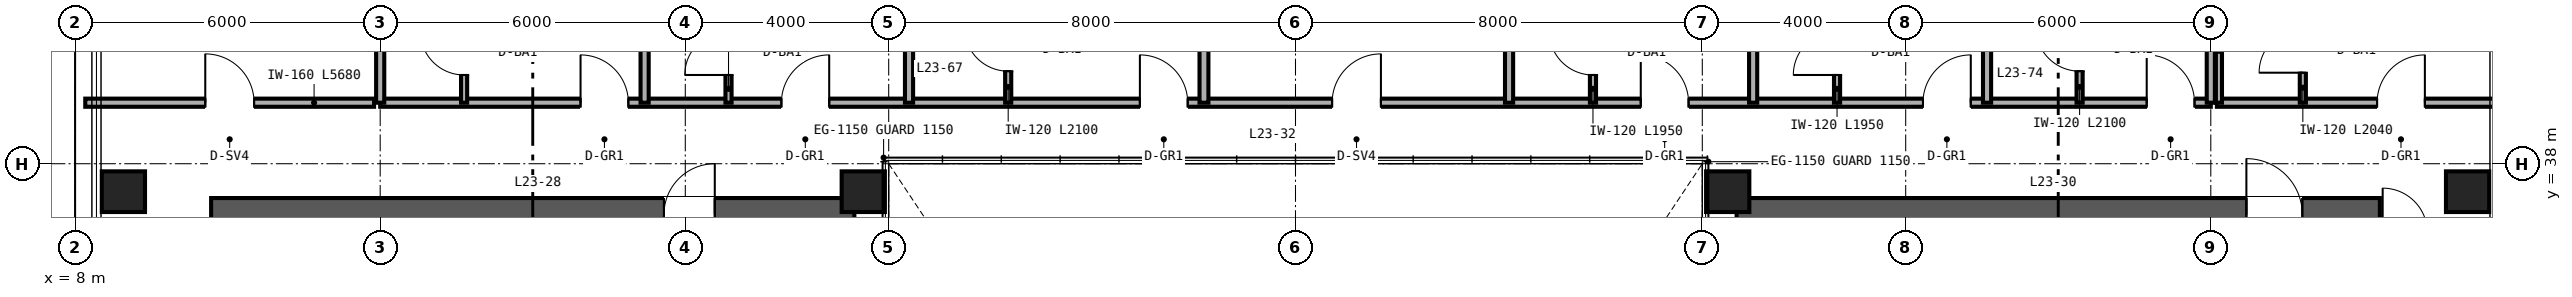
"""IFC4 building model, lengths in metres.
Left out: names, types, materials, properties, quantities, classifications, styles, units other than length and angle.
Written with IfcOpenShell. Run it as: python <this file> out.ifc"""

import sys

from ifc_helpers import new_model, si_unit, direction, frame, frame_2d, origin, origin_2d, place, context, subcontext, project, spatial, rectangle, hollow_rectangle, extrude, source, transform, mapped, element, fill, save


model = new_model("IFC4")
c1 = context("Model", 3, precision=1e-05, world=origin(), true_north=direction((0.0, 1.0)))
c2 = subcontext(c1, "Body", "Model", "MODEL_VIEW")
j1 = project(units=[si_unit("LENGTHUNIT", "METRE"), si_unit("PLANEANGLEUNIT", "RADIAN")], contexts=[c1])
p1 = place(None, origin())
s1 = spatial("IfcSite", under=j1, at=p1, CompositionType="ELEMENT")
p2 = place(p1, origin())
s2 = spatial("IfcBuilding", under=s1, at=p2, CompositionType="ELEMENT")
p3 = place(p2, frame((0.0, 0.0, 97.2)))
s3 = spatial("IfcBuildingStorey", under=s2, at=p3, CompositionType="ELEMENT", Elevation=97.2)
p4 = place(p3, frame((10.675, 37.0, 0.0), z_axis=(0.0, 0.0, 1.0), x_axis=(1.0, 0.0, 0.0)))
e1 = element("IfcWall", 1, at=p4, inside=s3, PredefinedType="SHEAR", context=c2, shape_type="SweptSolid", body=[
    extrude(rectangle(XDim=12.65, YDim=0.65, at=frame_2d((6.325, 0.0))), origin(), (0.0, 0.0, 1.0), 3.36),
])
p5 = place(p4, frame((8.905, 0.0, 0.0)))
e2 = element("IfcOpeningElement", 2, at=p5, cuts=e1, PredefinedType="OPENING", context=c2, shape_type="SweptSolid", body=[
    extrude(rectangle(XDim=1.0, YDim=2.15, at=frame_2d((0.5, 1.075))), frame((0.0, 0.335, 0.0), z_axis=(0.0, -1.0, 0.0), x_axis=(1.0, 0.0, 0.0)), (0.0, 0.0, 1.0), 0.67),
])
p6 = place(p3, frame((40.675, 37.0, 0.0), z_axis=(0.0, 0.0, 1.0), x_axis=(1.0, 0.0, 0.0)))
e3 = element("IfcWall", 3, at=p6, inside=s3, PredefinedType="SHEAR", context=c2, shape_type="SweptSolid", body=[
    extrude(rectangle(XDim=12.65, YDim=0.65, at=frame_2d((6.325, 0.0))), origin(), (0.0, 0.0, 1.0), 3.36),
])
p7 = place(p6, frame((10.025, 0.0, 0.0)))
e4 = element("IfcOpeningElement", 4, at=p7, cuts=e3, PredefinedType="OPENING", context=c2, shape_type="SweptSolid", body=[
    extrude(rectangle(XDim=1.1, YDim=2.15, at=frame_2d((0.55, 1.075))), frame((0.0, 0.335, 0.0), z_axis=(0.0, -1.0, 0.0), x_axis=(1.0, 0.0, 0.0)), (0.0, 0.0, 1.0), 0.67),
])
m1 = source(origin(), c2, "Body", "SweptSolid", [
    extrude(hollow_rectangle(XDim=0.85, YDim=0.8, WallThickness=0.032, at=origin_2d()), origin(), (0.0, 0.0, 1.0), 3.36),
])
for number, where, z_axis, x_axis in (
    (5, (8.95, 37.45, 0.0), (0.0, 0.0, 1.0), (1.0, 0.0, 0.0)),
    (6, (23.5, 37.45, 0.0), (0.0, 0.0, 1.0), (1.0, 0.0, 0.0)),
    (7, (40.5, 37.45, 0.0), (0.0, 0.0, 1.0), (1.0, 0.0, 0.0)),
    (8, (55.05, 37.45, 0.0), (0.0, 0.0, 1.0), (1.0, 0.0, 0.0)),
):
    element("IfcColumn", number, at=place(p3, frame(where, z_axis=z_axis, x_axis=x_axis)), inside=s3, PredefinedType="COLUMN", context=c2, shape_type="MappedRepresentation", body=[
        mapped(m1, transform((0.0, 0.0, 0.0), scale=1.0)),
    ])
p8 = place(p3, frame((8.2, 39.2, 0.0), z_axis=(0.0, 0.0, 1.0), x_axis=(1.0, 0.0, 0.0)))
e9 = element("IfcWall", 9, at=p8, inside=s3, PredefinedType="PARTITIONING", context=c2, shape_type="SweptSolid", body=[
    extrude(rectangle(XDim=5.68, YDim=0.16, at=frame_2d((2.84, 0.0))), origin(), (0.0, 0.0, 1.0), 3.36),
])
p9 = place(p8, frame((2.36, 0.0, 0.0)))
e10 = element("IfcOpeningElement", 10, at=p9, cuts=e9, PredefinedType="OPENING", context=c2, shape_type="SweptSolid", body=[
    extrude(rectangle(XDim=0.96, YDim=2.15, at=frame_2d((0.48, 1.075))), frame((0.0, 0.09, 0.0), z_axis=(0.0, -1.0, 0.0), x_axis=(1.0, 0.0, 0.0)), (0.0, 0.0, 1.0), 0.18),
])
p10 = place(p3, frame((50.12, 39.2, 0.0), z_axis=(0.0, 0.0, 1.0), x_axis=(1.0, 0.0, 0.0)))
e11 = element("IfcWall", 11, at=p10, inside=s3, PredefinedType="PARTITIONING", context=c2, shape_type="SweptSolid", body=[
    extrude(rectangle(XDim=5.68, YDim=0.16, at=frame_2d((2.84, 0.0))), origin(), (0.0, 0.0, 1.0), 3.36),
])
p11 = place(p10, frame((3.15, 0.0, 0.0)))
e12 = element("IfcOpeningElement", 12, at=p11, cuts=e11, PredefinedType="OPENING", context=c2, shape_type="SweptSolid", body=[
    extrude(rectangle(XDim=0.94, YDim=2.15, at=frame_2d((0.47, 1.075))), frame((0.0, 0.09, 0.0), z_axis=(0.0, -1.0, 0.0), x_axis=(1.0, 0.0, 0.0)), (0.0, 0.0, 1.0), 0.18),
])
p12 = place(p3, frame((51.81, 39.2, 0.0), z_axis=(0.0, 0.0, 1.0), x_axis=(0.0, 1.0, 0.0)))
e13 = element("IfcWall", 13, at=p12, inside=s3, PredefinedType="PARTITIONING", context=c2, shape_type="SweptSolid", body=[
    extrude(rectangle(XDim=2.04, YDim=0.12, at=frame_2d((1.02, 0.0))), origin(), (0.0, 0.0, 1.0), 3.36),
])
p13 = place(p12, frame((0.59, 0.0, 0.0)))
e14 = element("IfcOpeningElement", 14, at=p13, cuts=e13, PredefinedType="OPENING", context=c2, shape_type="SweptSolid", body=[
    extrude(rectangle(XDim=0.86, YDim=2.1, at=frame_2d((0.43, 1.05))), frame((0.0, 0.07, 0.0), z_axis=(0.0, -1.0, 0.0), x_axis=(1.0, 0.0, 0.0)), (0.0, 0.0, 1.0), 0.14),
])
p14 = place(p3, frame((50.16, 39.2, 0.0), z_axis=(0.0, 0.0, 1.0), x_axis=(0.0, 1.0, 0.0)))
e15 = element("IfcWall", 15, at=p14, inside=s3, PredefinedType="PARTITIONING", context=c2, shape_type="SweptSolid", body=[
    extrude(rectangle(XDim=2.04, YDim=0.12, at=frame_2d((1.02, 0.0))), origin(), (0.0, 0.0, 1.0), 3.36),
])
p15 = place(p3, frame((14.0, 39.2, 0.0), z_axis=(0.0, 0.0, 1.0), x_axis=(1.0, 0.0, 0.0)))
e16 = element("IfcWall", 16, at=p15, inside=s3, PredefinedType="PARTITIONING", context=c2, shape_type="SweptSolid", body=[
    extrude(rectangle(XDim=36.0, YDim=0.16, at=frame_2d((18.0, 0.0))), origin(), (0.0, 0.0, 1.0), 2.581),
])
p16 = place(p15, frame((3.94, 0.0, 0.0)))
e17 = element("IfcOpeningElement", 17, at=p16, cuts=e16, PredefinedType="OPENING", context=c2, shape_type="SweptSolid", body=[
    extrude(rectangle(XDim=0.94, YDim=2.15, at=frame_2d((0.47, 1.075))), frame((0.0, 0.09, 0.0), z_axis=(0.0, -1.0, 0.0), x_axis=(1.0, 0.0, 0.0)), (0.0, 0.0, 1.0), 0.18),
])
p17 = place(p15, frame((7.89, 0.0, 0.0)))
e18 = element("IfcOpeningElement", 18, at=p17, cuts=e16, PredefinedType="OPENING", context=c2, shape_type="SweptSolid", body=[
    extrude(rectangle(XDim=0.94, YDim=2.15, at=frame_2d((0.47, 1.075))), frame((0.0, 0.09, 0.0), z_axis=(0.0, -1.0, 0.0), x_axis=(1.0, 0.0, 0.0)), (0.0, 0.0, 1.0), 0.18),
])
p18 = place(p15, frame((14.94, 0.0, 0.0)))
e19 = element("IfcOpeningElement", 19, at=p18, cuts=e16, PredefinedType="OPENING", context=c2, shape_type="SweptSolid", body=[
    extrude(rectangle(XDim=0.94, YDim=2.15, at=frame_2d((0.47, 1.075))), frame((0.0, 0.09, 0.0), z_axis=(0.0, -1.0, 0.0), x_axis=(1.0, 0.0, 0.0)), (0.0, 0.0, 1.0), 0.18),
])
p19 = place(p15, frame((18.72, 0.0, 0.0)))
e20 = element("IfcOpeningElement", 20, at=p19, cuts=e16, PredefinedType="OPENING", context=c2, shape_type="SweptSolid", body=[
    extrude(rectangle(XDim=0.96, YDim=2.15, at=frame_2d((0.48, 1.075))), frame((0.0, 0.09, 0.0), z_axis=(0.0, -1.0, 0.0), x_axis=(1.0, 0.0, 0.0)), (0.0, 0.0, 1.0), 0.18),
])
p20 = place(p15, frame((24.79, 0.0, 0.0)))
e21 = element("IfcOpeningElement", 21, at=p20, cuts=e16, PredefinedType="OPENING", context=c2, shape_type="SweptSolid", body=[
    extrude(rectangle(XDim=0.94, YDim=2.15, at=frame_2d((0.47, 1.075))), frame((0.0, 0.09, 0.0), z_axis=(0.0, -1.0, 0.0), x_axis=(1.0, 0.0, 0.0)), (0.0, 0.0, 1.0), 0.18),
])
p21 = place(p15, frame((30.34, 0.0, 0.0)))
e22 = element("IfcOpeningElement", 22, at=p21, cuts=e16, PredefinedType="OPENING", context=c2, shape_type="SweptSolid", body=[
    extrude(rectangle(XDim=0.94, YDim=2.15, at=frame_2d((0.47, 1.075))), frame((0.0, 0.09, 0.0), z_axis=(0.0, -1.0, 0.0), x_axis=(1.0, 0.0, 0.0)), (0.0, 0.0, 1.0), 0.18),
])
p22 = place(p15, frame((34.74, 0.0, 0.0)))
e23 = element("IfcOpeningElement", 23, at=p22, cuts=e16, PredefinedType="OPENING", context=c2, shape_type="SweptSolid", body=[
    extrude(rectangle(XDim=0.94, YDim=2.15, at=frame_2d((0.47, 1.075))), frame((0.0, 0.09, 0.0), z_axis=(0.0, -1.0, 0.0), x_axis=(1.0, 0.0, 0.0)), (0.0, 0.0, 1.0), 0.18),
])
for number, where, z_axis, x_axis in (
    (24, (14.0, 39.2, 0.0), (0.0, 0.0, 1.0), (0.0, 1.0, 0.0)),
    (25, (50.0, 39.2, 0.0), (0.0, 0.0, 1.0), (0.0, 1.0, 0.0)),
    (26, (19.2, 39.2, 0.0), (0.0, 0.0, 1.0), (0.0, 1.0, 0.0)),
):
    element("IfcWall", number, at=place(p3, frame(where, z_axis=z_axis, x_axis=x_axis)), inside=s3, PredefinedType="PARTITIONING", context=c2, shape_type="SweptSolid", body=[
        extrude(rectangle(XDim=10.44, YDim=0.16, at=frame_2d((5.22, 0.0))), origin(), (0.0, 0.0, 1.0), 2.667),
    ])
p23 = place(p3, frame((15.65, 39.2, 0.0), z_axis=(0.0, 0.0, 1.0), x_axis=(0.0, 1.0, 0.0)))
e27 = element("IfcWall", 27, at=p23, inside=s3, PredefinedType="PARTITIONING", context=c2, shape_type="SweptSolid", body=[
    extrude(rectangle(XDim=1.95, YDim=0.12, at=frame_2d((0.975, 0.0))), origin(), (0.0, 0.0, 1.0), 3.36),
])
p24 = place(p23, frame((0.545, 0.0, 0.0)))
e28 = element("IfcOpeningElement", 28, at=p24, cuts=e27, PredefinedType="OPENING", context=c2, shape_type="SweptSolid", body=[
    extrude(rectangle(XDim=0.86, YDim=2.1, at=frame_2d((0.43, 1.05))), frame((0.0, 0.07, 0.0), z_axis=(0.0, -1.0, 0.0), x_axis=(1.0, 0.0, 0.0)), (0.0, 0.0, 1.0), 0.14),
])
p25 = place(p3, frame((24.4, 39.2, 0.0), z_axis=(0.0, 0.0, 1.0), x_axis=(0.0, 1.0, 0.0)))
e29 = element("IfcWall", 29, at=p25, inside=s3, PredefinedType="PARTITIONING", context=c2, shape_type="SweptSolid", body=[
    extrude(rectangle(XDim=10.44, YDim=0.16, at=frame_2d((5.22, 0.0))), origin(), (0.0, 0.0, 1.0), 2.433),
])
p26 = place(p3, frame((20.85, 39.2, 0.0), z_axis=(0.0, 0.0, 1.0), x_axis=(0.0, 1.0, 0.0)))
e30 = element("IfcWall", 30, at=p26, inside=s3, PredefinedType="PARTITIONING", context=c2, shape_type="SweptSolid", body=[
    extrude(rectangle(XDim=1.95, YDim=0.12, at=frame_2d((0.975, 0.0))), origin(), (0.0, 0.0, 1.0), 3.36),
])
p27 = place(p26, frame((0.545, 0.0, 0.0)))
e31 = element("IfcOpeningElement", 31, at=p27, cuts=e30, PredefinedType="OPENING", context=c2, shape_type="SweptSolid", body=[
    extrude(rectangle(XDim=0.86, YDim=2.1, at=frame_2d((0.43, 1.05))), frame((0.0, 0.07, 0.0), z_axis=(0.0, -1.0, 0.0), x_axis=(1.0, 0.0, 0.0)), (0.0, 0.0, 1.0), 0.14),
])
p28 = place(p3, frame((30.2, 39.2, 0.0), z_axis=(0.0, 0.0, 1.0), x_axis=(0.0, 1.0, 0.0)))
e32 = element("IfcWall", 32, at=p28, inside=s3, PredefinedType="PARTITIONING", context=c2, shape_type="SweptSolid", body=[
    extrude(rectangle(XDim=10.44, YDim=0.175, at=frame_2d((5.22, 0.0))), origin(), (0.0, 0.0, 1.0), 2.433),
])
p29 = place(p3, frame((26.35, 39.2, 0.0), z_axis=(0.0, 0.0, 1.0), x_axis=(0.0, 1.0, 0.0)))
e33 = element("IfcWall", 33, at=p29, inside=s3, PredefinedType="PARTITIONING", context=c2, shape_type="SweptSolid", body=[
    extrude(rectangle(XDim=2.1, YDim=0.12, at=frame_2d((1.05, 0.0))), origin(), (0.0, 0.0, 1.0), 3.36),
])
p30 = place(p29, frame((0.62, 0.0, 0.0)))
e34 = element("IfcOpeningElement", 34, at=p30, cuts=e33, PredefinedType="OPENING", context=c2, shape_type="SweptSolid", body=[
    extrude(rectangle(XDim=0.86, YDim=2.1, at=frame_2d((0.43, 1.05))), frame((0.0, 0.07, 0.0), z_axis=(0.0, -1.0, 0.0), x_axis=(1.0, 0.0, 0.0)), (0.0, 0.0, 1.0), 0.14),
])
p31 = place(p3, frame((36.2, 39.2, 0.0), z_axis=(0.0, 0.0, 1.0), x_axis=(0.0, 1.0, 0.0)))
e35 = element("IfcWall", 35, at=p31, inside=s3, PredefinedType="PARTITIONING", context=c2, shape_type="SweptSolid", body=[
    extrude(rectangle(XDim=10.44, YDim=0.16, at=frame_2d((5.22, 0.0))), origin(), (0.0, 0.0, 1.0), 2.433),
])
p32 = place(p3, frame((41.0, 39.2, 0.0), z_axis=(0.0, 0.0, 1.0), x_axis=(0.0, 1.0, 0.0)))
e36 = element("IfcWall", 36, at=p32, inside=s3, PredefinedType="PARTITIONING", context=c2, shape_type="SweptSolid", body=[
    extrude(rectangle(XDim=10.44, YDim=0.16, at=frame_2d((5.22, 0.0))), origin(), (0.0, 0.0, 1.0), 2.823),
])
p33 = place(p3, frame((37.85, 39.2, 0.0), z_axis=(0.0, 0.0, 1.0), x_axis=(0.0, 1.0, 0.0)))
e37 = element("IfcWall", 37, at=p33, inside=s3, PredefinedType="PARTITIONING", context=c2, shape_type="SweptSolid", body=[
    extrude(rectangle(XDim=1.95, YDim=0.12, at=frame_2d((0.975, 0.0))), origin(), (0.0, 0.0, 1.0), 3.36),
])
p34 = place(p33, frame((0.545, 0.0, 0.0)))
e38 = element("IfcOpeningElement", 38, at=p34, cuts=e37, PredefinedType="OPENING", context=c2, shape_type="SweptSolid", body=[
    extrude(rectangle(XDim=0.86, YDim=2.1, at=frame_2d((0.43, 1.05))), frame((0.0, 0.07, 0.0), z_axis=(0.0, -1.0, 0.0), x_axis=(1.0, 0.0, 0.0)), (0.0, 0.0, 1.0), 0.14),
])
p35 = place(p3, frame((45.6, 39.2, 0.0), z_axis=(0.0, 0.0, 1.0), x_axis=(0.0, 1.0, 0.0)))
e39 = element("IfcWall", 39, at=p35, inside=s3, PredefinedType="PARTITIONING", context=c2, shape_type="SweptSolid", body=[
    extrude(rectangle(XDim=10.44, YDim=0.16, at=frame_2d((5.22, 0.0))), origin(), (0.0, 0.0, 1.0), 2.667),
])
p36 = place(p3, frame((42.65, 39.2, 0.0), z_axis=(0.0, 0.0, 1.0), x_axis=(0.0, 1.0, 0.0)))
e40 = element("IfcWall", 40, at=p36, inside=s3, PredefinedType="PARTITIONING", context=c2, shape_type="SweptSolid", body=[
    extrude(rectangle(XDim=1.95, YDim=0.12, at=frame_2d((0.975, 0.0))), origin(), (0.0, 0.0, 1.0), 3.36),
])
p37 = place(p36, frame((0.545, 0.0, 0.0)))
e41 = element("IfcOpeningElement", 41, at=p37, cuts=e40, PredefinedType="OPENING", context=c2, shape_type="SweptSolid", body=[
    extrude(rectangle(XDim=0.86, YDim=2.1, at=frame_2d((0.43, 1.05))), frame((0.0, 0.07, 0.0), z_axis=(0.0, -1.0, 0.0), x_axis=(1.0, 0.0, 0.0)), (0.0, 0.0, 1.0), 0.14),
])
p38 = place(p3, frame((47.42, 39.2, 0.0), z_axis=(0.0, 0.0, 1.0), x_axis=(0.0, 1.0, 0.0)))
e42 = element("IfcWall", 42, at=p38, inside=s3, PredefinedType="PARTITIONING", context=c2, shape_type="SweptSolid", body=[
    extrude(rectangle(XDim=2.1, YDim=0.12, at=frame_2d((1.05, 0.0))), origin(), (0.0, 0.0, 1.0), 3.36),
])
p39 = place(p38, frame((0.62, 0.0, 0.0)))
e43 = element("IfcOpeningElement", 43, at=p39, cuts=e42, PredefinedType="OPENING", context=c2, shape_type="SweptSolid", body=[
    extrude(rectangle(XDim=0.86, YDim=2.1, at=frame_2d((0.43, 1.05))), frame((0.0, 0.07, 0.0), z_axis=(0.0, -1.0, 0.0), x_axis=(1.0, 0.0, 0.0)), (0.0, 0.0, 1.0), 0.14),
])
m2 = source(origin(), c2, "Body", "SweptSolid", [
    extrude(rectangle(XDim=1.0, YDim=2.15, at=frame_2d((0.5, 1.075))), frame((0.0, 0.025, 0.0), z_axis=(0.0, -1.0, 0.0), x_axis=(1.0, 0.0, 0.0)), (0.0, 0.0, 1.0), 0.05),
])
p40 = place(p5, origin())
e44 = element("IfcDoor", 44, at=p40, inside=s3, OperationType="SINGLE_SWING_RIGHT", PredefinedType="DOOR", context=c2, shape_type="MappedRepresentation", body=[
    mapped(m2, transform((0.0, 0.0, 0.0), scale=1.0)),
])
fill(e2, e44)
m3 = source(origin(), c2, "Body", "SweptSolid", [
    extrude(rectangle(XDim=1.1, YDim=2.15, at=frame_2d((0.55, 1.075))), frame((0.0, 0.025, 0.0), z_axis=(0.0, -1.0, 0.0), x_axis=(1.0, 0.0, 0.0)), (0.0, 0.0, 1.0), 0.05),
])
p41 = place(p7, origin())
e45 = element("IfcDoor", 45, at=p41, inside=s3, OperationType="SINGLE_SWING_LEFT", PredefinedType="DOOR", context=c2, shape_type="MappedRepresentation", body=[
    mapped(m3, transform((0.0, 0.0, 0.0), scale=1.0)),
])
fill(e4, e45)
m4 = source(origin(), c2, "Body", "SweptSolid", [
    extrude(rectangle(XDim=0.96, YDim=2.15, at=frame_2d((0.48, 1.075))), frame((0.0, 0.025, 0.0), z_axis=(0.0, -1.0, 0.0), x_axis=(1.0, 0.0, 0.0)), (0.0, 0.0, 1.0), 0.05),
])
p42 = place(p9, origin())
e46 = element("IfcDoor", 46, at=p42, inside=s3, OperationType="SINGLE_SWING_LEFT", PredefinedType="DOOR", context=c2, shape_type="MappedRepresentation", body=[
    mapped(m4, transform((0.0, 0.0, 0.0), scale=1.0)),
])
fill(e10, e46)
m5 = source(origin(), c2, "Body", "SweptSolid", [
    extrude(rectangle(XDim=0.86, YDim=2.1, at=frame_2d((0.43, 1.05))), frame((0.0, 0.025, 0.0), z_axis=(0.0, -1.0, 0.0), x_axis=(1.0, 0.0, 0.0)), (0.0, 0.0, 1.0), 0.05),
])
p43 = place(p13, origin())
e47 = element("IfcDoor", 47, at=p43, inside=s3, OperationType="SINGLE_SWING_LEFT", PredefinedType="DOOR", context=c2, shape_type="MappedRepresentation", body=[
    mapped(m5, transform((0.0, 0.0, 0.0), scale=1.0)),
])
fill(e14, e47)
m6 = source(origin(), c2, "Body", "SweptSolid", [
    extrude(rectangle(XDim=0.94, YDim=2.15, at=frame_2d((0.47, 1.075))), frame((0.0, 0.025, 0.0), z_axis=(0.0, -1.0, 0.0), x_axis=(1.0, 0.0, 0.0)), (0.0, 0.0, 1.0), 0.05),
])
p44 = place(p11, origin())
e48 = element("IfcDoor", 48, at=p44, inside=s3, OperationType="SINGLE_SWING_RIGHT", PredefinedType="DOOR", context=c2, shape_type="MappedRepresentation", body=[
    mapped(m6, transform((0.0, 0.0, 0.0), scale=1.0)),
])
fill(e12, e48)
p45 = place(p24, origin())
e49 = element("IfcDoor", 49, at=p45, inside=s3, OperationType="SINGLE_SWING_RIGHT", PredefinedType="DOOR", context=c2, shape_type="MappedRepresentation", body=[
    mapped(m5, transform((0.0, 0.0, 0.0), scale=1.0)),
])
fill(e28, e49)
p46 = place(p27, origin())
e50 = element("IfcDoor", 50, at=p46, inside=s3, OperationType="SINGLE_SWING_LEFT", PredefinedType="DOOR", context=c2, shape_type="MappedRepresentation", body=[
    mapped(m5, transform((0.0, 0.0, 0.0), scale=1.0)),
])
fill(e31, e50)
p47 = place(p30, origin())
e51 = element("IfcDoor", 51, at=p47, inside=s3, OperationType="SINGLE_SWING_RIGHT", PredefinedType="DOOR", context=c2, shape_type="MappedRepresentation", body=[
    mapped(m5, transform((0.0, 0.0, 0.0), scale=1.0)),
])
fill(e34, e51)
p48 = place(p34, origin())
e52 = element("IfcDoor", 52, at=p48, inside=s3, OperationType="SINGLE_SWING_RIGHT", PredefinedType="DOOR", context=c2, shape_type="MappedRepresentation", body=[
    mapped(m5, transform((0.0, 0.0, 0.0), scale=1.0)),
])
fill(e38, e52)
p49 = place(p37, origin())
e53 = element("IfcDoor", 53, at=p49, inside=s3, OperationType="SINGLE_SWING_LEFT", PredefinedType="DOOR", context=c2, shape_type="MappedRepresentation", body=[
    mapped(m5, transform((0.0, 0.0, 0.0), scale=1.0)),
])
fill(e41, e53)
p50 = place(p39, origin())
e54 = element("IfcDoor", 54, at=p50, inside=s3, OperationType="SINGLE_SWING_RIGHT", PredefinedType="DOOR", context=c2, shape_type="MappedRepresentation", body=[
    mapped(m5, transform((0.0, 0.0, 0.0), scale=1.0)),
])
fill(e43, e54)
p51 = place(p16, origin())
e55 = element("IfcDoor", 55, at=p51, inside=s3, OperationType="SINGLE_SWING_LEFT", PredefinedType="DOOR", context=c2, shape_type="MappedRepresentation", body=[
    mapped(m6, transform((0.0, 0.0, 0.0), scale=1.0)),
])
fill(e17, e55)
p52 = place(p17, origin())
e56 = element("IfcDoor", 56, at=p52, inside=s3, OperationType="SINGLE_SWING_RIGHT", PredefinedType="DOOR", context=c2, shape_type="MappedRepresentation", body=[
    mapped(m6, transform((0.0, 0.0, 0.0), scale=1.0)),
])
fill(e18, e56)
p53 = place(p18, origin())
e57 = element("IfcDoor", 57, at=p53, inside=s3, OperationType="SINGLE_SWING_LEFT", PredefinedType="DOOR", context=c2, shape_type="MappedRepresentation", body=[
    mapped(m6, transform((0.0, 0.0, 0.0), scale=1.0)),
])
fill(e19, e57)
p54 = place(p19, origin())
e58 = element("IfcDoor", 58, at=p54, inside=s3, OperationType="SINGLE_SWING_RIGHT", PredefinedType="DOOR", context=c2, shape_type="MappedRepresentation", body=[
    mapped(m4, transform((0.0, 0.0, 0.0), scale=1.0)),
])
fill(e20, e58)
p55 = place(p20, origin())
e59 = element("IfcDoor", 59, at=p55, inside=s3, OperationType="SINGLE_SWING_LEFT", PredefinedType="DOOR", context=c2, shape_type="MappedRepresentation", body=[
    mapped(m6, transform((0.0, 0.0, 0.0), scale=1.0)),
])
fill(e21, e59)
p56 = place(p21, origin())
e60 = element("IfcDoor", 60, at=p56, inside=s3, OperationType="SINGLE_SWING_RIGHT", PredefinedType="DOOR", context=c2, shape_type="MappedRepresentation", body=[
    mapped(m6, transform((0.0, 0.0, 0.0), scale=1.0)),
])
fill(e22, e60)
p57 = place(p22, origin())
e61 = element("IfcDoor", 61, at=p57, inside=s3, OperationType="SINGLE_SWING_LEFT", PredefinedType="DOOR", context=c2, shape_type="MappedRepresentation", body=[
    mapped(m6, transform((0.0, 0.0, 0.0), scale=1.0)),
])
fill(e23, e61)
save(model, sys.argv[1])
